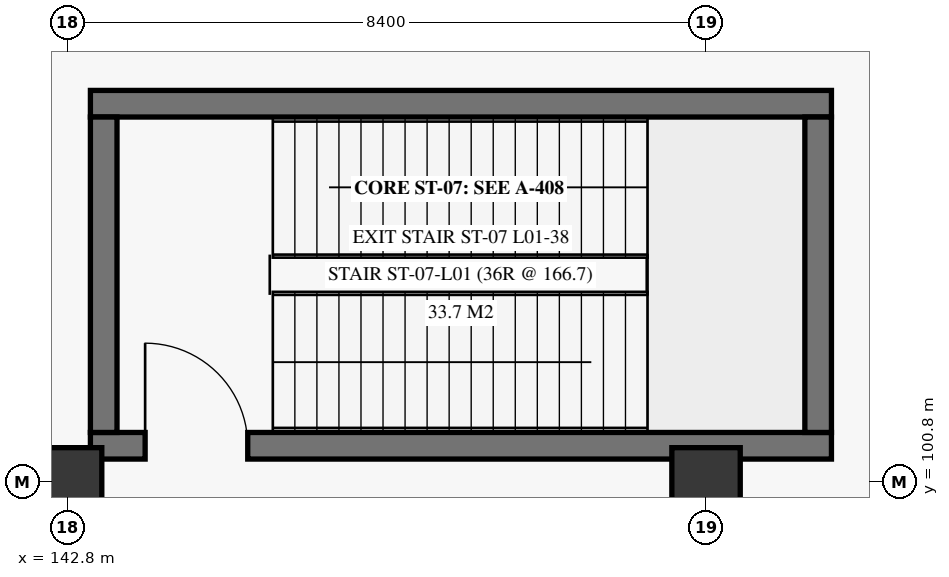
"""IFC4 building model, lengths in metres.
Left out: names, types, materials, properties, quantities, classifications, styles, units other than length and angle.
Written with IfcOpenShell. Run it as: python <this file> out.ifc"""

import sys

from ifc_helpers import new_model, si_unit, direction, frame, frame_2d, origin, origin_2d, place, context, subcontext, project, spatial, rectangle, extrude, element, fill, save


model = new_model("IFC4")
c1 = context("Model", 3, precision=1e-05, world=origin(), true_north=direction((0.0, 1.0)))
c2 = subcontext(c1, "Body", "Model", "MODEL_VIEW")
j1 = project(units=[si_unit("LENGTHUNIT", "METRE"), si_unit("PLANEANGLEUNIT", "RADIAN")], contexts=[c1])
p1 = place(None, origin())
s1 = spatial("IfcSite", under=j1, at=p1, CompositionType="ELEMENT")
p2 = place(p1, origin())
s2 = spatial("IfcBuilding", under=s1, at=p2, CompositionType="ELEMENT")
p3 = place(p2, origin())
s3 = spatial("IfcBuildingStorey", under=s2, at=p3, CompositionType="ELEMENT", Elevation=0.0)
for number, where, z_axis, x_axis in (
    (1, (142.8, 100.8, 0.0), (0.0, 0.0, 1.0), (1.0, 0.0, 0.0)),
    (2, (151.2, 100.8, 0.0), (0.0, 0.0, 1.0), (1.0, 0.0, 0.0)),
):
    element("IfcColumn", number, at=place(p3, frame(where, z_axis=z_axis, x_axis=x_axis)), inside=s3, PredefinedType="COLUMN", context=c2, shape_type="SweptSolid", body=[
        extrude(rectangle(XDim=0.9, YDim=0.9, at=origin_2d()), origin(), (0.0, 0.0, 1.0), 5.7),
    ])
p4 = place(p3, frame((143.1, 101.275, 0.0), z_axis=(0.0, 0.0, 1.0), x_axis=(1.0, 0.0, 0.0)))
e3 = element("IfcWall", 3, at=p4, inside=s3, PredefinedType="SHEAR", context=c2, shape_type="SweptSolid", body=[
    extrude(rectangle(XDim=9.75, YDim=0.35, at=frame_2d((4.875, 0.0))), origin(), (0.0, 0.0, 1.0), 5.7),
])
p5 = place(p4, frame((0.72, 0.0, 0.0)))
e4 = element("IfcOpeningElement", 4, at=p5, cuts=e3, PredefinedType="OPENING", context=c2, shape_type="SweptSolid", body=[
    extrude(rectangle(XDim=1.35, YDim=2.25, at=frame_2d((0.675, 1.125))), frame((0.0, 0.185, 0.0), z_axis=(0.0, -1.0, 0.0), x_axis=(1.0, 0.0, 0.0)), (0.0, 0.0, 1.0), 0.37),
])
p6 = place(p3, frame((143.1, 105.775, 0.0), z_axis=(0.0, 0.0, 1.0), x_axis=(1.0, 0.0, 0.0)))
e5 = element("IfcWall", 5, at=p6, inside=s3, PredefinedType="SHEAR", context=c2, shape_type="SweptSolid", body=[
    extrude(rectangle(XDim=9.75, YDim=0.35, at=frame_2d((4.875, 0.0))), origin(), (0.0, 0.0, 1.0), 5.7),
])
for number, where, z_axis, x_axis in (
    (6, (143.275, 101.45, 0.0), (0.0, 0.0, 1.0), (0.0, 1.0, 0.0)),
    (7, (152.675, 101.45, 0.0), (0.0, 0.0, 1.0), (0.0, 1.0, 0.0)),
):
    element("IfcWall", number, at=place(p3, frame(where, z_axis=z_axis, x_axis=x_axis)), inside=s3, PredefinedType="SHEAR", context=c2, shape_type="SweptSolid", body=[
        extrude(rectangle(XDim=4.15, YDim=0.35, at=frame_2d((2.075, 0.0))), origin(), (0.0, 0.0, 1.0), 5.7),
    ])
p7 = place(p5, origin())
e8 = element("IfcDoor", 8, at=p7, inside=s3, OperationType="SINGLE_SWING_LEFT", PredefinedType="DOOR", context=c2, shape_type="SweptSolid", body=[
    extrude(rectangle(XDim=1.35, YDim=2.25, at=frame_2d((0.675, 1.125))), frame((0.0, 0.025, 0.0), z_axis=(0.0, -1.0, 0.0), x_axis=(1.0, 0.0, 0.0)), (0.0, 0.0, 1.0), 0.05),
])
fill(e4, e8)
save(model, sys.argv[1])
